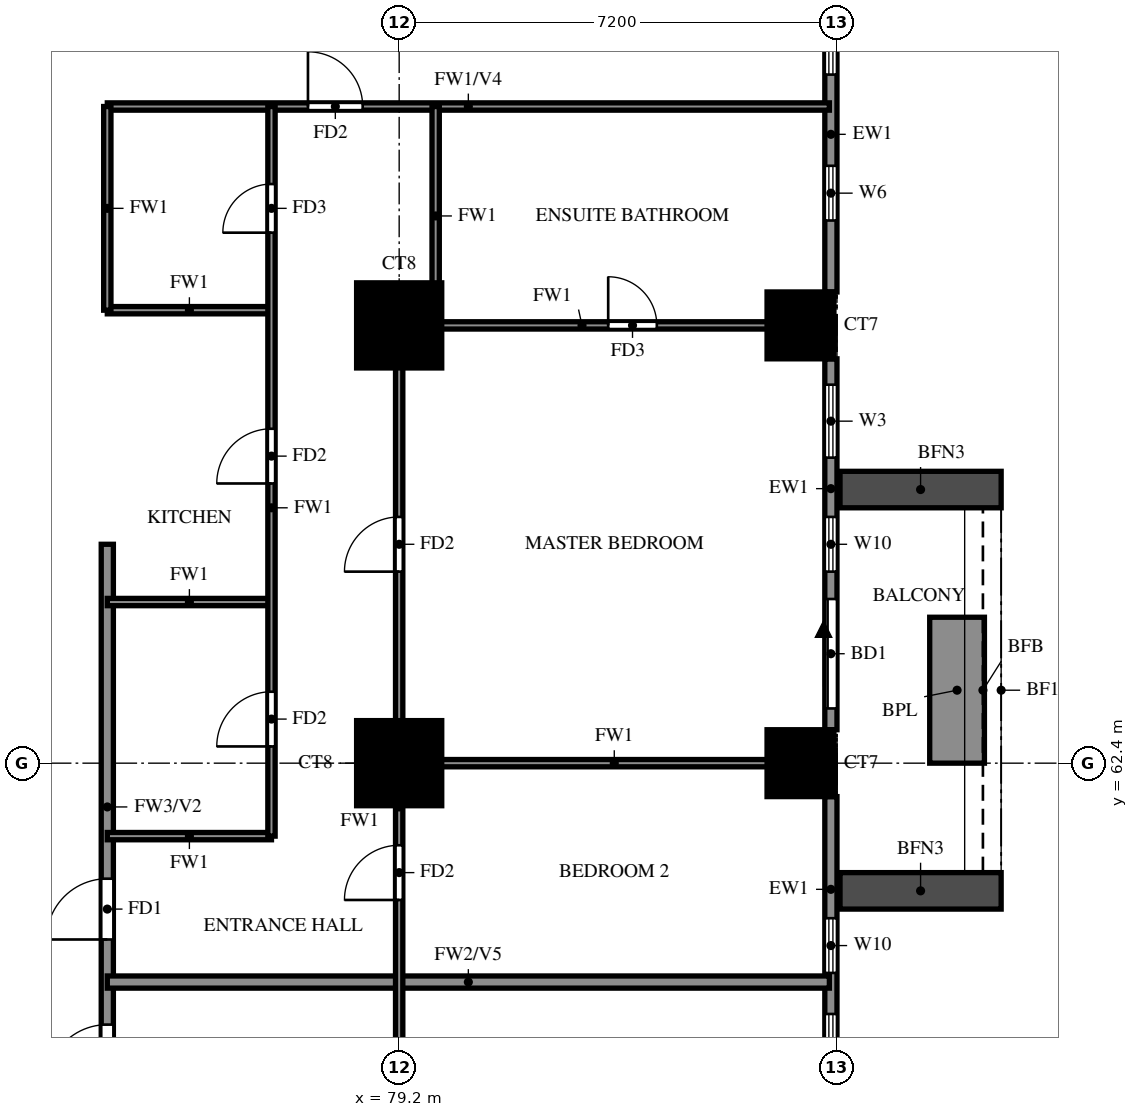
"""IFC4 building model, lengths in metres.
Left out: names, types, materials, properties, quantities, classifications, styles, units other than length and angle.
Written with IfcOpenShell. Run it as: python <this file> out.ifc"""

import sys

from ifc_helpers import new_model, si_unit, direction, frame, frame_2d, origin, origin_2d, place, context, subcontext, project, spatial, rectangle, extrude, source, transform, mapped, element, fill, save


model = new_model("IFC4")
c1 = context("Model", 3, precision=1e-05, world=origin(), true_north=direction((0.0, 1.0)))
c2 = subcontext(c1, "Body", "Model", "MODEL_VIEW")
j1 = project(units=[si_unit("LENGTHUNIT", "METRE"), si_unit("PLANEANGLEUNIT", "RADIAN")], contexts=[c1])
p1 = place(None, origin())
s1 = spatial("IfcSite", under=j1, at=p1, CompositionType="ELEMENT")
p2 = place(p1, origin())
s2 = spatial("IfcBuilding", under=s1, at=p2, CompositionType="ELEMENT")
p3 = place(p2, frame((0.0, 0.0, 58.5)))
s3 = spatial("IfcBuildingStorey", under=s2, at=p3, CompositionType="ELEMENT", Elevation=58.5)
m1 = source(origin(), c2, "Body", "SweptSolid", [
    extrude(rectangle(XDim=1.4, YDim=1.4, at=origin_2d()), origin(), (0.0, 0.0, 1.0), 3.18),
])
p4 = place(p3, frame((79.2, 62.4, 0.0), z_axis=(0.0, 0.0, 1.0), x_axis=(1.0, 0.0, 0.0)))
e1 = element("IfcColumn", 1, at=p4, inside=s3, PredefinedType="COLUMN", context=c2, shape_type="MappedRepresentation", body=[
    mapped(m1, transform((0.0, 0.0, 0.0))),
])
m2 = source(origin(), c2, "Body", "SweptSolid", [
    extrude(rectangle(XDim=1.1, YDim=1.1, at=origin_2d()), origin(), (0.0, 0.0, 1.0), 3.18),
])
p5 = place(p3, frame((85.8, 62.4, 0.0), z_axis=(0.0, 0.0, 1.0), x_axis=(1.0, 0.0, 0.0)))
e2 = element("IfcColumn", 2, at=p5, inside=s3, PredefinedType="COLUMN", context=c2, shape_type="MappedRepresentation", body=[
    mapped(m2, transform((0.0, 0.0, 0.0))),
])
p6 = place(p3, frame((79.2, 69.6, 0.0), z_axis=(0.0, 0.0, 1.0), x_axis=(1.0, 0.0, 0.0)))
e3 = element("IfcColumn", 3, at=p6, inside=s3, PredefinedType="COLUMN", context=c2, shape_type="MappedRepresentation", body=[
    mapped(m1, transform((0.0, 0.0, 0.0))),
])
p7 = place(p3, frame((85.8, 69.6, 0.0), z_axis=(0.0, 0.0, 1.0), x_axis=(1.0, 0.0, 0.0)))
e4 = element("IfcColumn", 4, at=p7, inside=s3, PredefinedType="COLUMN", context=c2, shape_type="MappedRepresentation", body=[
    mapped(m2, transform((0.0, 0.0, 0.0))),
])
p8 = place(p3, frame((86.3, 55.75, 0.0), z_axis=(0.0, 0.0, 1.0), x_axis=(0.0, 1.0, 0.0)))
e5 = element("IfcWall", 5, at=p8, inside=s3, PredefinedType="SOLIDWALL", context=c2, shape_type="SweptSolid", body=[
    extrude(rectangle(XDim=6.1, YDim=0.2, at=frame_2d((3.05, 0.0))), origin(), (0.0, 0.0, 1.0), 3.18),
])
p9 = place(p8, frame((0.725, 0.0, 0.6)))
e6 = element("IfcOpeningElement", 6, at=p9, cuts=e5, PredefinedType="OPENING", context=c2, shape_type="SweptSolid", body=[
    extrude(rectangle(XDim=1.8, YDim=2.4, at=frame_2d((0.9, 1.2))), frame((0.0, 0.11, 0.0), z_axis=(0.0, -1.0, 0.0), x_axis=(1.0, 0.0, 0.0)), (0.0, 0.0, 1.0), 0.22),
])
p10 = place(p8, frame((3.2, 0.0, 0.6)))
e7 = element("IfcOpeningElement", 7, at=p10, cuts=e5, PredefinedType="OPENING", context=c2, shape_type="SweptSolid", body=[
    extrude(rectangle(XDim=0.9, YDim=2.4, at=frame_2d((0.45, 1.2))), frame((0.0, 0.11, 0.0), z_axis=(0.0, -1.0, 0.0), x_axis=(1.0, 0.0, 0.0)), (0.0, 0.0, 1.0), 0.22),
])
p11 = place(p3, frame((86.3, 62.95, 0.0), z_axis=(0.0, 0.0, 1.0), x_axis=(0.0, 1.0, 0.0)))
e8 = element("IfcWall", 8, at=p11, inside=s3, PredefinedType="SOLIDWALL", context=c2, shape_type="SweptSolid", body=[
    extrude(rectangle(XDim=6.1, YDim=0.2, at=frame_2d((3.05, 0.0))), origin(), (0.0, 0.0, 1.0), 3.18),
])
p12 = place(p11, frame((0.35, 0.0, 0.0)))
e9 = element("IfcOpeningElement", 9, at=p12, cuts=e8, PredefinedType="OPENING", context=c2, shape_type="SweptSolid", body=[
    extrude(rectangle(XDim=1.8, YDim=2.4, at=frame_2d((0.9, 1.2))), frame((0.0, 0.11, 0.0), z_axis=(0.0, -1.0, 0.0), x_axis=(1.0, 0.0, 0.0)), (0.0, 0.0, 1.0), 0.22),
])
p13 = place(p11, frame((2.6, 0.0, 0.6)))
e10 = element("IfcOpeningElement", 10, at=p13, cuts=e8, PredefinedType="OPENING", context=c2, shape_type="SweptSolid", body=[
    extrude(rectangle(XDim=0.9, YDim=2.4, at=frame_2d((0.45, 1.2))), frame((0.0, 0.11, 0.0), z_axis=(0.0, -1.0, 0.0), x_axis=(1.0, 0.0, 0.0)), (0.0, 0.0, 1.0), 0.22),
])
p14 = place(p11, frame((4.475, 0.0, 0.6)))
e11 = element("IfcOpeningElement", 11, at=p14, cuts=e8, PredefinedType="OPENING", context=c2, shape_type="SweptSolid", body=[
    extrude(rectangle(XDim=1.2, YDim=2.4, at=frame_2d((0.6, 1.2))), frame((0.0, 0.11, 0.0), z_axis=(0.0, -1.0, 0.0), x_axis=(1.0, 0.0, 0.0)), (0.0, 0.0, 1.0), 0.22),
])
p15 = place(p3, frame((86.3, 70.15, 0.0), z_axis=(0.0, 0.0, 1.0), x_axis=(0.0, 1.0, 0.0)))
e12 = element("IfcWall", 12, at=p15, inside=s3, PredefinedType="SOLIDWALL", context=c2, shape_type="SweptSolid", body=[
    extrude(rectangle(XDim=6.1, YDim=0.2, at=frame_2d((3.05, 0.0))), origin(), (0.0, 0.0, 1.0), 3.18),
])
p16 = place(p15, frame((1.175, 0.0, 1.5)))
e13 = element("IfcOpeningElement", 13, at=p16, cuts=e12, PredefinedType="OPENING", context=c2, shape_type="SweptSolid", body=[
    extrude(rectangle(XDim=0.9, YDim=0.9, at=frame_2d((0.45, 0.45))), frame((0.0, 0.11, 0.0), z_axis=(0.0, -1.0, 0.0), x_axis=(1.0, 0.0, 0.0)), (0.0, 0.0, 1.0), 0.22),
])
p17 = place(p15, frame((3.575, 0.0, 0.6)))
e14 = element("IfcOpeningElement", 14, at=p17, cuts=e12, PredefinedType="OPENING", context=c2, shape_type="SweptSolid", body=[
    extrude(rectangle(XDim=1.8, YDim=2.4, at=frame_2d((0.9, 1.2))), frame((0.0, 0.11, 0.0), z_axis=(0.0, -1.0, 0.0), x_axis=(1.0, 0.0, 0.0)), (0.0, 0.0, 1.0), 0.22),
])
for number, where, z_axis, x_axis in (
    (15, (86.45, 60.3, 0.0), (0.0, 0.0, 1.0), (1.0, 0.0, 0.0)),
    (16, (86.45, 66.9, 0.0), (0.0, 0.0, 1.0), (1.0, 0.0, 0.0)),
):
    element("IfcWall", number, at=place(p3, frame(where, z_axis=z_axis, x_axis=x_axis)), inside=s3, PredefinedType="SOLIDWALL", context=c2, shape_type="SweptSolid", body=[
        extrude(rectangle(XDim=2.65, YDim=0.6, at=frame_2d((1.325, 0.0))), origin(), (0.0, 0.0, 1.0), 2.85),
    ])
p18 = place(p3, frame((88.375, 62.4, 0.0), z_axis=(0.0, 0.0, 1.0), x_axis=(0.0, 1.0, 0.0)))
e17 = element("IfcWall", 17, at=p18, inside=s3, PredefinedType="SOLIDWALL", context=c2, shape_type="SweptSolid", body=[
    extrude(rectangle(XDim=2.4, YDim=0.9, at=frame_2d((1.2, 0.0))), origin(), (0.0, 0.0, 1.0), 0.9),
])
p19 = place(p3, frame((74.4, 56.4, 0.0), z_axis=(0.0, 0.0, 1.0), x_axis=(0.0, 1.0, 0.0)))
e18 = element("IfcWall", 18, at=p19, inside=s3, PredefinedType="SOLIDWALL", context=c2, shape_type="SweptSolid", body=[
    extrude(rectangle(XDim=9.6, YDim=0.2, at=frame_2d((4.8, 0.0))), origin(), (0.0, 0.0, 1.0), 3.18),
])
p20 = place(p19, frame((0.7, 0.0, 0.0)))
e19 = element("IfcOpeningElement", 19, at=p20, cuts=e18, PredefinedType="OPENING", context=c2, shape_type="SweptSolid", body=[
    extrude(rectangle(XDim=1.0, YDim=2.1, at=frame_2d((0.5, 1.05))), frame((0.0, 0.11, 0.0), z_axis=(0.0, -1.0, 0.0), x_axis=(1.0, 0.0, 0.0)), (0.0, 0.0, 1.0), 0.22),
])
p21 = place(p19, frame((3.1, 0.0, 0.0)))
e20 = element("IfcOpeningElement", 20, at=p21, cuts=e18, PredefinedType="OPENING", context=c2, shape_type="SweptSolid", body=[
    extrude(rectangle(XDim=1.0, YDim=2.1, at=frame_2d((0.5, 1.05))), frame((0.0, 0.11, 0.0), z_axis=(0.0, -1.0, 0.0), x_axis=(1.0, 0.0, 0.0)), (0.0, 0.0, 1.0), 0.22),
])
p22 = place(p3, frame((74.4, 58.8, 0.0), z_axis=(0.0, 0.0, 1.0), x_axis=(1.0, 0.0, 0.0)))
e21 = element("IfcWall", 21, at=p22, inside=s3, PredefinedType="SOLIDWALL", context=c2, shape_type="SweptSolid", body=[
    extrude(rectangle(XDim=11.875, YDim=0.2, at=frame_2d((5.938, 0.0))), origin(), (0.0, 0.0, 1.0), 2.28),
])
p23 = place(p3, frame((74.4, 61.2, 0.0), z_axis=(0.0, 0.0, 1.0), x_axis=(1.0, 0.0, 0.0)))
e22 = element("IfcWall", 22, at=p23, inside=s3, PredefinedType="PARTITIONING", context=c2, shape_type="SweptSolid", body=[
    extrude(rectangle(XDim=2.7, YDim=0.12, at=frame_2d((1.35, 0.0))), origin(), (0.0, 0.0, 1.0), 3.18),
])
p24 = place(p3, frame((79.2, 62.4, 0.0), z_axis=(0.0, 0.0, 1.0), x_axis=(1.0, 0.0, 0.0)))
e23 = element("IfcWall", 23, at=p24, inside=s3, PredefinedType="PARTITIONING", context=c2, shape_type="SweptSolid", body=[
    extrude(rectangle(XDim=7.075, YDim=0.12, at=frame_2d((3.538, 0.0))), origin(), (0.0, 0.0, 1.0), 3.18),
])
p25 = place(p3, frame((74.4, 65.05, 0.0), z_axis=(0.0, 0.0, 1.0), x_axis=(1.0, 0.0, 0.0)))
e24 = element("IfcWall", 24, at=p25, inside=s3, PredefinedType="PARTITIONING", context=c2, shape_type="SweptSolid", body=[
    extrude(rectangle(XDim=2.7, YDim=0.12, at=frame_2d((1.35, 0.0))), origin(), (0.0, 0.0, 1.0), 3.18),
])
p26 = place(p3, frame((79.2, 69.6, 0.0), z_axis=(0.0, 0.0, 1.0), x_axis=(1.0, 0.0, 0.0)))
e25 = element("IfcWall", 25, at=p26, inside=s3, PredefinedType="PARTITIONING", context=c2, shape_type="SweptSolid", body=[
    extrude(rectangle(XDim=7.075, YDim=0.12, at=frame_2d((3.538, 0.0))), origin(), (0.0, 0.0, 1.0), 3.18),
])
p27 = place(p26, frame((3.438, 0.0, 0.0)))
e26 = element("IfcOpeningElement", 26, at=p27, cuts=e25, PredefinedType="OPENING", context=c2, shape_type="SweptSolid", body=[
    extrude(rectangle(XDim=0.8, YDim=2.1, at=frame_2d((0.4, 1.05))), frame((0.0, 0.07, 0.0), z_axis=(0.0, -1.0, 0.0), x_axis=(1.0, 0.0, 0.0)), (0.0, 0.0, 1.0), 0.14),
])
p28 = place(p3, frame((74.4, 69.85, 0.0), z_axis=(0.0, 0.0, 1.0), x_axis=(1.0, 0.0, 0.0)))
e27 = element("IfcWall", 27, at=p28, inside=s3, PredefinedType="PARTITIONING", context=c2, shape_type="SweptSolid", body=[
    extrude(rectangle(XDim=2.7, YDim=0.12, at=frame_2d((1.35, 0.0))), origin(), (0.0, 0.0, 1.0), 3.18),
])
p29 = place(p3, frame((74.4, 73.2, 0.0), z_axis=(0.0, 0.0, 1.0), x_axis=(1.0, 0.0, 0.0)))
e28 = element("IfcWall", 28, at=p29, inside=s3, PredefinedType="PARTITIONING", context=c2, shape_type="SweptSolid", body=[
    extrude(rectangle(XDim=11.875, YDim=0.12, at=frame_2d((5.938, 0.0))), origin(), (0.0, 0.0, 1.0), 2.28),
])
p30 = place(p29, frame((3.3, 0.0, 0.0)))
e29 = element("IfcOpeningElement", 29, at=p30, cuts=e28, PredefinedType="OPENING", context=c2, shape_type="SweptSolid", body=[
    extrude(rectangle(XDim=0.9, YDim=2.1, at=frame_2d((0.45, 1.05))), frame((0.0, 0.07, 0.0), z_axis=(0.0, -1.0, 0.0), x_axis=(1.0, 0.0, 0.0)), (0.0, 0.0, 1.0), 0.14),
])
p31 = place(p3, frame((74.4, 69.85, 0.0), z_axis=(0.0, 0.0, 1.0), x_axis=(0.0, 1.0, 0.0)))
e30 = element("IfcWall", 30, at=p31, inside=s3, PredefinedType="PARTITIONING", context=c2, shape_type="SweptSolid", body=[
    extrude(rectangle(XDim=3.35, YDim=0.12, at=frame_2d((1.675, 0.0))), origin(), (0.0, 0.0, 1.0), 3.18),
])
p32 = place(p3, frame((77.1, 61.2, 0.0), z_axis=(0.0, 0.0, 1.0), x_axis=(0.0, 1.0, 0.0)))
e31 = element("IfcWall", 31, at=p32, inside=s3, PredefinedType="PARTITIONING", context=c2, shape_type="SweptSolid", body=[
    extrude(rectangle(XDim=12.0, YDim=0.12, at=frame_2d((6.0, 0.0))), origin(), (0.0, 0.0, 1.0), 3.18),
])
p33 = place(p32, frame((1.475, 0.0, 0.0)))
e32 = element("IfcOpeningElement", 32, at=p33, cuts=e31, PredefinedType="OPENING", context=c2, shape_type="SweptSolid", body=[
    extrude(rectangle(XDim=0.9, YDim=2.1, at=frame_2d((0.45, 1.05))), frame((0.0, 0.07, 0.0), z_axis=(0.0, -1.0, 0.0), x_axis=(1.0, 0.0, 0.0)), (0.0, 0.0, 1.0), 0.14),
])
p34 = place(p32, frame((5.8, 0.0, 0.0)))
e33 = element("IfcOpeningElement", 33, at=p34, cuts=e31, PredefinedType="OPENING", context=c2, shape_type="SweptSolid", body=[
    extrude(rectangle(XDim=0.9, YDim=2.1, at=frame_2d((0.45, 1.05))), frame((0.0, 0.07, 0.0), z_axis=(0.0, -1.0, 0.0), x_axis=(1.0, 0.0, 0.0)), (0.0, 0.0, 1.0), 0.14),
])
p35 = place(p32, frame((9.925, 0.0, 0.0)))
e34 = element("IfcOpeningElement", 34, at=p35, cuts=e31, PredefinedType="OPENING", context=c2, shape_type="SweptSolid", body=[
    extrude(rectangle(XDim=0.8, YDim=2.1, at=frame_2d((0.4, 1.05))), frame((0.0, 0.07, 0.0), z_axis=(0.0, -1.0, 0.0), x_axis=(1.0, 0.0, 0.0)), (0.0, 0.0, 1.0), 0.14),
])
p36 = place(p3, frame((79.2, 55.2, 0.0), z_axis=(0.0, 0.0, 1.0), x_axis=(0.0, 1.0, 0.0)))
e35 = element("IfcWall", 35, at=p36, inside=s3, PredefinedType="PARTITIONING", context=c2, shape_type="SweptSolid", body=[
    extrude(rectangle(XDim=14.4, YDim=0.12, at=frame_2d((7.2, 0.0))), origin(), (0.0, 0.0, 1.0), 3.18),
])
p37 = place(p36, frame((1.05, 0.0, 0.0)))
e36 = element("IfcOpeningElement", 36, at=p37, cuts=e35, PredefinedType="OPENING", context=c2, shape_type="SweptSolid", body=[
    extrude(rectangle(XDim=1.5, YDim=2.1, at=frame_2d((0.75, 1.05))), frame((0.0, 0.07, 0.0), z_axis=(0.0, -1.0, 0.0), x_axis=(1.0, 0.0, 0.0)), (0.0, 0.0, 1.0), 0.14),
])
p38 = place(p36, frame((4.95, 0.0, 0.0)))
e37 = element("IfcOpeningElement", 37, at=p38, cuts=e35, PredefinedType="OPENING", context=c2, shape_type="SweptSolid", body=[
    extrude(rectangle(XDim=0.9, YDim=2.1, at=frame_2d((0.45, 1.05))), frame((0.0, 0.07, 0.0), z_axis=(0.0, -1.0, 0.0), x_axis=(1.0, 0.0, 0.0)), (0.0, 0.0, 1.0), 0.14),
])
p39 = place(p36, frame((10.35, 0.0, 0.0)))
e38 = element("IfcOpeningElement", 38, at=p39, cuts=e35, PredefinedType="OPENING", context=c2, shape_type="SweptSolid", body=[
    extrude(rectangle(XDim=0.9, YDim=2.1, at=frame_2d((0.45, 1.05))), frame((0.0, 0.07, 0.0), z_axis=(0.0, -1.0, 0.0), x_axis=(1.0, 0.0, 0.0)), (0.0, 0.0, 1.0), 0.14),
])
p40 = place(p3, frame((79.8, 69.6, 0.0), z_axis=(0.0, 0.0, 1.0), x_axis=(0.0, 1.0, 0.0)))
e39 = element("IfcWall", 39, at=p40, inside=s3, PredefinedType="PARTITIONING", context=c2, shape_type="SweptSolid", body=[
    extrude(rectangle(XDim=3.6, YDim=0.12, at=frame_2d((1.8, 0.0))), origin(), (0.0, 0.0, 1.0), 3.18),
])
p41 = place(p9, origin())
e40 = element("IfcWindow", 40, at=p41, inside=s3, PartitioningType="DOUBLE_PANEL_VERTICAL", PredefinedType="WINDOW", context=c2, shape_type="SweptSolid", body=[
    extrude(rectangle(XDim=1.8, YDim=2.4, at=frame_2d((0.9, 1.2))), frame((0.0, 0.03, 0.0), z_axis=(0.0, -1.0, 0.0), x_axis=(1.0, 0.0, 0.0)), (0.0, 0.0, 1.0), 0.06),
])
fill(e6, e40)
p42 = place(p10, origin())
e41 = element("IfcWindow", 41, at=p42, inside=s3, PartitioningType="SINGLE_PANEL", PredefinedType="WINDOW", context=c2, shape_type="SweptSolid", body=[
    extrude(rectangle(XDim=0.9, YDim=2.4, at=frame_2d((0.45, 1.2))), frame((0.0, 0.03, 0.0), z_axis=(0.0, -1.0, 0.0), x_axis=(1.0, 0.0, 0.0)), (0.0, 0.0, 1.0), 0.06),
])
fill(e7, e41)
p43 = place(p12, origin())
e42 = element("IfcDoor", 42, at=p43, inside=s3, OperationType="DOUBLE_DOOR_SLIDING", PredefinedType="DOOR", context=c2, shape_type="SweptSolid", body=[
    extrude(rectangle(XDim=1.8, YDim=2.4, at=frame_2d((0.9, 1.2))), frame((0.0, 0.025, 0.0), z_axis=(0.0, -1.0, 0.0), x_axis=(1.0, 0.0, 0.0)), (0.0, 0.0, 1.0), 0.05),
])
fill(e9, e42)
p44 = place(p13, origin())
e43 = element("IfcWindow", 43, at=p44, inside=s3, PartitioningType="SINGLE_PANEL", PredefinedType="WINDOW", context=c2, shape_type="SweptSolid", body=[
    extrude(rectangle(XDim=0.9, YDim=2.4, at=frame_2d((0.45, 1.2))), frame((0.0, 0.03, 0.0), z_axis=(0.0, -1.0, 0.0), x_axis=(1.0, 0.0, 0.0)), (0.0, 0.0, 1.0), 0.06),
])
fill(e10, e43)
p45 = place(p14, origin())
e44 = element("IfcWindow", 44, at=p45, inside=s3, PartitioningType="SINGLE_PANEL", PredefinedType="WINDOW", context=c2, shape_type="SweptSolid", body=[
    extrude(rectangle(XDim=1.2, YDim=2.4, at=frame_2d((0.6, 1.2))), frame((0.0, 0.03, 0.0), z_axis=(0.0, -1.0, 0.0), x_axis=(1.0, 0.0, 0.0)), (0.0, 0.0, 1.0), 0.06),
])
fill(e11, e44)
p46 = place(p16, origin())
e45 = element("IfcWindow", 45, at=p46, inside=s3, PartitioningType="SINGLE_PANEL", PredefinedType="WINDOW", context=c2, shape_type="SweptSolid", body=[
    extrude(rectangle(XDim=0.9, YDim=0.9, at=frame_2d((0.45, 0.45))), frame((0.0, 0.03, 0.0), z_axis=(0.0, -1.0, 0.0), x_axis=(1.0, 0.0, 0.0)), (0.0, 0.0, 1.0), 0.06),
])
fill(e13, e45)
p47 = place(p17, origin())
e46 = element("IfcWindow", 46, at=p47, inside=s3, PartitioningType="DOUBLE_PANEL_VERTICAL", PredefinedType="WINDOW", context=c2, shape_type="SweptSolid", body=[
    extrude(rectangle(XDim=1.8, YDim=2.4, at=frame_2d((0.9, 1.2))), frame((0.0, 0.03, 0.0), z_axis=(0.0, -1.0, 0.0), x_axis=(1.0, 0.0, 0.0)), (0.0, 0.0, 1.0), 0.06),
])
fill(e14, e46)
p48 = place(p20, origin())
e47 = element("IfcDoor", 47, at=p48, inside=s3, OperationType="SINGLE_SWING_LEFT", PredefinedType="DOOR", context=c2, shape_type="SweptSolid", body=[
    extrude(rectangle(XDim=1.0, YDim=2.1, at=frame_2d((0.5, 1.05))), frame((0.0, 0.025, 0.0), z_axis=(0.0, -1.0, 0.0), x_axis=(1.0, 0.0, 0.0)), (0.0, 0.0, 1.0), 0.05),
])
fill(e19, e47)
p49 = place(p21, origin())
e48 = element("IfcDoor", 48, at=p49, inside=s3, OperationType="SINGLE_SWING_LEFT", PredefinedType="DOOR", context=c2, shape_type="SweptSolid", body=[
    extrude(rectangle(XDim=1.0, YDim=2.1, at=frame_2d((0.5, 1.05))), frame((0.0, 0.025, 0.0), z_axis=(0.0, -1.0, 0.0), x_axis=(1.0, 0.0, 0.0)), (0.0, 0.0, 1.0), 0.05),
])
fill(e20, e48)
p50 = place(p38, origin())
e49 = element("IfcDoor", 49, at=p50, inside=s3, OperationType="SINGLE_SWING_LEFT", PredefinedType="DOOR", context=c2, shape_type="SweptSolid", body=[
    extrude(rectangle(XDim=0.9, YDim=2.1, at=frame_2d((0.45, 1.05))), frame((0.0, 0.025, 0.0), z_axis=(0.0, -1.0, 0.0), x_axis=(1.0, 0.0, 0.0)), (0.0, 0.0, 1.0), 0.05),
])
fill(e37, e49)
p51 = place(p39, origin())
e50 = element("IfcDoor", 50, at=p51, inside=s3, OperationType="SINGLE_SWING_RIGHT", PredefinedType="DOOR", context=c2, shape_type="SweptSolid", body=[
    extrude(rectangle(XDim=0.9, YDim=2.1, at=frame_2d((0.45, 1.05))), frame((0.0, 0.025, 0.0), z_axis=(0.0, -1.0, 0.0), x_axis=(1.0, 0.0, 0.0)), (0.0, 0.0, 1.0), 0.05),
])
fill(e38, e50)
p52 = place(p27, origin())
e51 = element("IfcDoor", 51, at=p52, inside=s3, OperationType="SINGLE_SWING_LEFT", PredefinedType="DOOR", context=c2, shape_type="SweptSolid", body=[
    extrude(rectangle(XDim=0.8, YDim=2.1, at=frame_2d((0.4, 1.05))), frame((0.0, 0.025, 0.0), z_axis=(0.0, -1.0, 0.0), x_axis=(1.0, 0.0, 0.0)), (0.0, 0.0, 1.0), 0.05),
])
fill(e26, e51)
p53 = place(p30, origin())
e52 = element("IfcDoor", 52, at=p53, inside=s3, OperationType="SINGLE_SWING_LEFT", PredefinedType="DOOR", context=c2, shape_type="SweptSolid", body=[
    extrude(rectangle(XDim=0.9, YDim=2.1, at=frame_2d((0.45, 1.05))), frame((0.0, 0.025, 0.0), z_axis=(0.0, -1.0, 0.0), x_axis=(1.0, 0.0, 0.0)), (0.0, 0.0, 1.0), 0.05),
])
fill(e29, e52)
p54 = place(p33, origin())
e53 = element("IfcDoor", 53, at=p54, inside=s3, OperationType="SINGLE_SWING_RIGHT", PredefinedType="DOOR", context=c2, shape_type="SweptSolid", body=[
    extrude(rectangle(XDim=0.9, YDim=2.1, at=frame_2d((0.45, 1.05))), frame((0.0, 0.025, 0.0), z_axis=(0.0, -1.0, 0.0), x_axis=(1.0, 0.0, 0.0)), (0.0, 0.0, 1.0), 0.05),
])
fill(e32, e53)
p55 = place(p34, origin())
e54 = element("IfcDoor", 54, at=p55, inside=s3, OperationType="SINGLE_SWING_LEFT", PredefinedType="DOOR", context=c2, shape_type="SweptSolid", body=[
    extrude(rectangle(XDim=0.9, YDim=2.1, at=frame_2d((0.45, 1.05))), frame((0.0, 0.025, 0.0), z_axis=(0.0, -1.0, 0.0), x_axis=(1.0, 0.0, 0.0)), (0.0, 0.0, 1.0), 0.05),
])
fill(e33, e54)
p56 = place(p35, origin())
e55 = element("IfcDoor", 55, at=p56, inside=s3, OperationType="SINGLE_SWING_LEFT", PredefinedType="DOOR", context=c2, shape_type="SweptSolid", body=[
    extrude(rectangle(XDim=0.8, YDim=2.1, at=frame_2d((0.4, 1.05))), frame((0.0, 0.025, 0.0), z_axis=(0.0, -1.0, 0.0), x_axis=(1.0, 0.0, 0.0)), (0.0, 0.0, 1.0), 0.05),
])
fill(e34, e55)
save(model, sys.argv[1])
